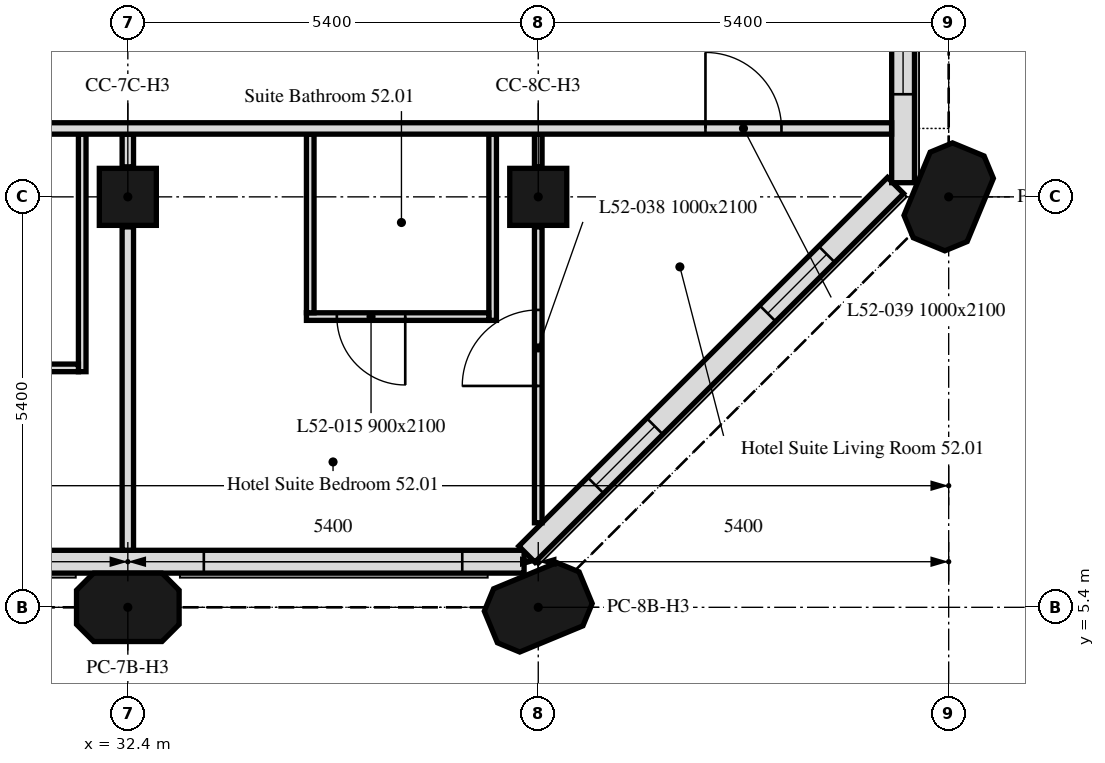
"""IFC4 building model, lengths in metres.
Left out: names, types, materials, properties, quantities, classifications, styles, units other than length and angle.
Written with IfcOpenShell. Run it as: python <this file> out.ifc"""

import sys

from ifc_helpers import new_model, si_unit, direction, frame, frame_2d, origin, origin_2d, place, context, subcontext, project, spatial, polyline, rectangle, outline, extrude, element, fill, save


model = new_model("IFC4")
c1 = context("Model", 3, precision=1e-05, world=origin(), true_north=direction((0.0, 1.0)))
c2 = subcontext(c1, "Body", "Model", "MODEL_VIEW")
j1 = project(units=[si_unit("LENGTHUNIT", "METRE"), si_unit("PLANEANGLEUNIT", "RADIAN")], contexts=[c1])
p1 = place(None, origin())
s1 = spatial("IfcSite", under=j1, at=p1, CompositionType="ELEMENT")
p2 = place(p1, origin())
s2 = spatial("IfcBuilding", under=s1, at=p2, CompositionType="ELEMENT")
p3 = place(p2, frame((0.0, 0.0, 210.4)))
s3 = spatial("IfcBuildingStorey", under=s2, at=p3, CompositionType="ELEMENT", Elevation=210.4)
for number, where, z_axis, x_axis in (
    (1, (32.4, 5.4, 0.0), (0.0, 0.0, 1.0), (1.0, 0.0, 0.0)),
    (2, (37.8, 5.4, 0.0), (0.0, 0.0, 1.0), (0.924, 0.383, 0.0)),
):
    element("IfcColumn", number, at=place(p3, frame(where, z_axis=z_axis, x_axis=x_axis)), inside=s3, PredefinedType="COLUMN", context=c2, shape_type="SweptSolid", body=[
        extrude(outline(polyline([(-0.45, -0.45), (0.45, -0.45), (0.675, -0.225), (0.675, 0.225), (0.45, 0.45), (-0.45, 0.45), (-0.675, 0.225), (-0.675, -0.225), (-0.45, -0.45)])), origin(), (0.0, 0.0, 1.0), 3.0),
    ])
for number, where, z_axis, x_axis in (
    (3, (32.4, 10.8, 0.0), (0.0, 0.0, 1.0), (1.0, 0.0, 0.0)),
    (4, (37.8, 10.8, 0.0), (0.0, 0.0, 1.0), (1.0, 0.0, 0.0)),
):
    element("IfcColumn", number, at=place(p3, frame(where, z_axis=z_axis, x_axis=x_axis)), inside=s3, PredefinedType="COLUMN", context=c2, shape_type="SweptSolid", body=[
        extrude(rectangle(XDim=0.75, YDim=0.75, at=origin_2d()), origin(), (0.0, 0.0, 1.0), 3.0),
    ])
p4 = place(p3, frame((43.2, 10.8, 0.0), z_axis=(0.0, 0.0, 1.0), x_axis=(0.382683432365, 0.923879532511, 0.0)))
e5 = element("IfcColumn", 5, at=p4, inside=s3, PredefinedType="COLUMN", context=c2, shape_type="SweptSolid", body=[
    extrude(outline(polyline([(-0.45, -0.45), (0.45, -0.45), (0.675, -0.225), (0.675, 0.225), (0.45, 0.45), (-0.45, 0.45), (-0.675, 0.225), (-0.675, -0.225), (-0.45, -0.45)])), origin(), (0.0, 0.0, 1.0), 3.0),
])
p5 = place(p3, frame((5.586, 6.0, 0.0), z_axis=(0.0, 0.0, 1.0), x_axis=(1.0, 0.0, 0.0)))
e6 = element("IfcWall", 6, at=p5, inside=s3, PredefinedType="SOLIDWALL", context=c2, shape_type="SweptSolid", body=[
    extrude(rectangle(XDim=32.027, YDim=0.3, at=frame_2d((16.014, 0.0))), origin(), (0.0, 0.0, 1.0), 3.0),
])
p6 = place(p5, frame((2.764, 0.0, 0.9)))
e7 = element("IfcOpeningElement", 7, at=p6, cuts=e6, PredefinedType="OPENING", context=c2, shape_type="SweptSolid", body=[
    extrude(rectangle(XDim=1.1, YDim=1.7, at=frame_2d((0.55, 0.85))), frame((0.0, 0.16, 0.0), z_axis=(0.0, -1.0, 0.0), x_axis=(1.0, 0.0, 0.0)), (0.0, 0.0, 1.0), 0.32),
])
p7 = place(p5, frame((6.214, 0.0, 0.9)))
e8 = element("IfcOpeningElement", 8, at=p7, cuts=e6, PredefinedType="OPENING", context=c2, shape_type="SweptSolid", body=[
    extrude(rectangle(XDim=3.4, YDim=1.7, at=frame_2d((1.7, 0.85))), frame((0.0, 0.16, 0.0), z_axis=(0.0, -1.0, 0.0), x_axis=(1.0, 0.0, 0.0)), (0.0, 0.0, 1.0), 0.32),
])
p8 = place(p5, frame((13.564, 0.0, 0.9)))
e9 = element("IfcOpeningElement", 9, at=p8, cuts=e6, PredefinedType="OPENING", context=c2, shape_type="SweptSolid", body=[
    extrude(rectangle(XDim=1.1, YDim=1.7, at=frame_2d((0.55, 0.85))), frame((0.0, 0.16, 0.0), z_axis=(0.0, -1.0, 0.0), x_axis=(1.0, 0.0, 0.0)), (0.0, 0.0, 1.0), 0.32),
])
p9 = place(p5, frame((17.014, 0.0, 0.9)))
e10 = element("IfcOpeningElement", 10, at=p9, cuts=e6, PredefinedType="OPENING", context=c2, shape_type="SweptSolid", body=[
    extrude(rectangle(XDim=3.4, YDim=1.7, at=frame_2d((1.7, 0.85))), frame((0.0, 0.16, 0.0), z_axis=(0.0, -1.0, 0.0), x_axis=(1.0, 0.0, 0.0)), (0.0, 0.0, 1.0), 0.32),
])
p10 = place(p5, frame((24.364, 0.0, 0.9)))
e11 = element("IfcOpeningElement", 11, at=p10, cuts=e6, PredefinedType="OPENING", context=c2, shape_type="SweptSolid", body=[
    extrude(rectangle(XDim=1.1, YDim=1.7, at=frame_2d((0.55, 0.85))), frame((0.0, 0.16, 0.0), z_axis=(0.0, -1.0, 0.0), x_axis=(1.0, 0.0, 0.0)), (0.0, 0.0, 1.0), 0.32),
])
p11 = place(p5, frame((27.814, 0.0, 0.9)))
e12 = element("IfcOpeningElement", 12, at=p11, cuts=e6, PredefinedType="OPENING", context=c2, shape_type="SweptSolid", body=[
    extrude(rectangle(XDim=3.4, YDim=1.7, at=frame_2d((1.7, 0.85))), frame((0.0, 0.16, 0.0), z_axis=(0.0, -1.0, 0.0), x_axis=(1.0, 0.0, 0.0)), (0.0, 0.0, 1.0), 0.32),
])
p12 = place(p3, frame((37.65, 6.099, 0.0), z_axis=(0.0, 0.0, 1.0), x_axis=(0.707106781187, 0.707106781187, 0.0)))
e13 = element("IfcWall", 13, at=p12, inside=s3, PredefinedType="SOLIDWALL", context=c2, shape_type="SweptSolid", body=[
    extrude(rectangle(XDim=6.86, YDim=0.3, at=frame_2d((3.43, 0.0))), origin(), (0.0, 0.0, 1.0), 3.0),
])
p13 = place(p12, frame((1.28, 0.0, 0.9)))
e14 = element("IfcOpeningElement", 14, at=p13, cuts=e13, PredefinedType="OPENING", context=c2, shape_type="SweptSolid", body=[
    extrude(rectangle(XDim=1.1, YDim=1.7, at=frame_2d((0.55, 0.85))), frame((0.0, 0.16, 0.0), z_axis=(0.0, -1.0, 0.0), x_axis=(1.0, 0.0, 0.0)), (0.0, 0.0, 1.0), 0.32),
])
p14 = place(p12, frame((4.48, 0.0, 0.9)))
e15 = element("IfcOpeningElement", 15, at=p14, cuts=e13, PredefinedType="OPENING", context=c2, shape_type="SweptSolid", body=[
    extrude(rectangle(XDim=1.1, YDim=1.7, at=frame_2d((0.55, 0.85))), frame((0.0, 0.16, 0.0), z_axis=(0.0, -1.0, 0.0), x_axis=(1.0, 0.0, 0.0)), (0.0, 0.0, 1.0), 0.32),
])
p15 = place(p3, frame((42.6, 10.986, 0.0), z_axis=(0.0, 0.0, 1.0), x_axis=(0.0, 1.0, 0.0)))
e16 = element("IfcWall", 16, at=p15, inside=s3, PredefinedType="SOLIDWALL", context=c2, shape_type="SweptSolid", body=[
    extrude(rectangle(XDim=5.214, YDim=0.3, at=frame_2d((2.607, 0.0))), origin(), (0.0, 0.0, 1.0), 3.0),
])
p16 = place(p15, frame((1.164, 0.0, 0.9)))
e17 = element("IfcOpeningElement", 17, at=p16, cuts=e16, PredefinedType="OPENING", context=c2, shape_type="SweptSolid", body=[
    extrude(rectangle(XDim=1.1, YDim=1.7, at=frame_2d((0.55, 0.85))), frame((0.0, 0.16, 0.0), z_axis=(0.0, -1.0, 0.0), x_axis=(1.0, 0.0, 0.0)), (0.0, 0.0, 1.0), 0.32),
])
p17 = place(p15, frame((2.764, 0.0, 0.9)))
e18 = element("IfcOpeningElement", 18, at=p17, cuts=e16, PredefinedType="OPENING", context=c2, shape_type="SweptSolid", body=[
    extrude(rectangle(XDim=1.1, YDim=1.7, at=frame_2d((0.55, 0.85))), frame((0.0, 0.16, 0.0), z_axis=(0.0, -1.0, 0.0), x_axis=(1.0, 0.0, 0.0)), (0.0, 0.0, 1.0), 0.32),
])
p18 = place(p3, frame((37.8, 6.512, 0.0), z_axis=(0.0, 0.0, 1.0), x_axis=(0.0, 1.0, 0.0)))
e19 = element("IfcWall", 19, at=p18, inside=s3, PredefinedType="PARTITIONING", context=c2, shape_type="SweptSolid", body=[
    extrude(rectangle(XDim=3.893, YDim=0.1, at=frame_2d((1.946, 0.0))), origin(), (0.0, 0.0, 1.0), 3.0),
])
p19 = place(p18, frame((1.8, 0.0, 0.0)))
e20 = element("IfcOpeningElement", 20, at=p19, cuts=e19, PredefinedType="OPENING", context=c2, shape_type="SweptSolid", body=[
    extrude(rectangle(XDim=1.0, YDim=2.1, at=frame_2d((0.5, 1.05))), frame((0.0, 0.05, 0.0), z_axis=(0.0, -1.0, 0.0), x_axis=(1.0, 0.0, 0.0)), (0.0, 0.0, 1.0), 0.1),
])
p20 = place(p3, frame((37.8, 11.195, 0.0), z_axis=(0.0, 0.0, 1.0), x_axis=(0.0, 1.0, 0.0)))
e21 = element("IfcWall", 21, at=p20, inside=s3, PredefinedType="PARTITIONING", context=c2, shape_type="SweptSolid", body=[
    extrude(rectangle(XDim=0.43, YDim=0.1, at=frame_2d((0.215, 0.0))), origin(), (0.0, 0.0, 1.0), 3.0),
])
p21 = place(p3, frame((37.2, 11.625, 0.0), z_axis=(0.0, 0.0, 1.0), x_axis=(0.0, -1.0, 0.0)))
e22 = element("IfcWall", 22, at=p21, inside=s3, PredefinedType="PARTITIONING", context=c2, shape_type="SweptSolid", body=[
    extrude(rectangle(XDim=2.45, YDim=0.1, at=frame_2d((1.225, 0.0))), origin(), (0.0, 0.0, 1.0), 3.0),
])
p22 = place(p3, frame((37.15, 9.225, 0.0), z_axis=(0.0, 0.0, 1.0), x_axis=(-1.0, 0.0, 0.0)))
e23 = element("IfcWall", 23, at=p22, inside=s3, PredefinedType="PARTITIONING", context=c2, shape_type="SweptSolid", body=[
    extrude(rectangle(XDim=2.4, YDim=0.1, at=frame_2d((1.2, 0.0))), origin(), (0.0, 0.0, 1.0), 3.0),
])
p23 = place(p22, frame((1.1, 0.0, 0.0)))
e24 = element("IfcOpeningElement", 24, at=p23, cuts=e23, PredefinedType="OPENING", context=c2, shape_type="SweptSolid", body=[
    extrude(rectangle(XDim=0.9, YDim=2.1, at=frame_2d((0.45, 1.05))), frame((0.0, 0.05, 0.0), z_axis=(0.0, -1.0, 0.0), x_axis=(1.0, 0.0, 0.0)), (0.0, 0.0, 1.0), 0.1),
])
p24 = place(p3, frame((34.8, 9.275, 0.0), z_axis=(0.0, 0.0, 1.0), x_axis=(0.0, 1.0, 0.0)))
e25 = element("IfcWall", 25, at=p24, inside=s3, PredefinedType="PARTITIONING", context=c2, shape_type="SweptSolid", body=[
    extrude(rectangle(XDim=2.35, YDim=0.1, at=frame_2d((1.175, 0.0))), origin(), (0.0, 0.0, 1.0), 3.0),
])
p25 = place(p3, frame((32.4, 11.625, 0.0), z_axis=(0.0, 0.0, 1.0), x_axis=(0.0, -1.0, 0.0)))
e26 = element("IfcWall", 26, at=p25, inside=s3, PredefinedType="PARTITIONING", context=c2, shape_type="SweptSolid", body=[
    extrude(rectangle(XDim=0.43, YDim=0.15, at=frame_2d((0.215, 0.0))), origin(), (0.0, 0.0, 1.0), 3.0),
])
p26 = place(p3, frame((32.4, 10.405, 0.0), z_axis=(0.0, 0.0, 1.0), x_axis=(0.0, -1.0, 0.0)))
e27 = element("IfcWall", 27, at=p26, inside=s3, PredefinedType="PARTITIONING", context=c2, shape_type="SweptSolid", body=[
    extrude(rectangle(XDim=4.254, YDim=0.15, at=frame_2d((2.127, 0.0))), origin(), (0.0, 0.0, 1.0), 3.0),
])
p27 = place(p3, frame((31.8, 11.625, 0.0), z_axis=(0.0, 0.0, 1.0), x_axis=(0.0, -1.0, 0.0)))
e28 = element("IfcWall", 28, at=p27, inside=s3, PredefinedType="PARTITIONING", context=c2, shape_type="SweptSolid", body=[
    extrude(rectangle(XDim=3.125, YDim=0.1, at=frame_2d((1.562, 0.0))), origin(), (0.0, 0.0, 1.0), 3.0),
])
p28 = place(p3, frame((31.75, 8.55, 0.0), z_axis=(0.0, 0.0, 1.0), x_axis=(-1.0, 0.0, 0.0)))
e29 = element("IfcWall", 29, at=p28, inside=s3, PredefinedType="PARTITIONING", context=c2, shape_type="SweptSolid", body=[
    extrude(rectangle(XDim=2.1, YDim=0.1, at=frame_2d((1.05, 0.0))), origin(), (0.0, 0.0, 1.0), 3.0),
])
p29 = place(p3, frame((0.751, 11.7, 0.0), z_axis=(0.0, 0.0, 1.0), x_axis=(1.0, 0.0, 0.0)))
e30 = element("IfcWall", 30, at=p29, inside=s3, PredefinedType="PARTITIONING", context=c2, shape_type="SweptSolid", body=[
    extrude(rectangle(XDim=41.698, YDim=0.15, at=frame_2d((20.849, 0.0))), origin(), (0.0, 0.0, 1.0), 3.0),
])
p30 = place(p29, frame((39.249, 0.0, 0.0)))
e31 = element("IfcOpeningElement", 31, at=p30, cuts=e30, PredefinedType="OPENING", context=c2, shape_type="SweptSolid", body=[
    extrude(rectangle(XDim=1.0, YDim=2.1, at=frame_2d((0.5, 1.05))), frame((0.0, 0.075, 0.0), z_axis=(0.0, -1.0, 0.0), x_axis=(1.0, 0.0, 0.0)), (0.0, 0.0, 1.0), 0.15),
])
p31 = place(p29, frame((27.649, 0.0, 0.0)))
e32 = element("IfcOpeningElement", 32, at=p31, cuts=e30, PredefinedType="OPENING", context=c2, shape_type="SweptSolid", body=[
    extrude(rectangle(XDim=1.0, YDim=2.1, at=frame_2d((0.5, 1.05))), frame((0.0, 0.075, 0.0), z_axis=(0.0, -1.0, 0.0), x_axis=(1.0, 0.0, 0.0)), (0.0, 0.0, 1.0), 0.15),
])
p32 = place(p29, frame((22.249, 0.0, 0.0)))
e33 = element("IfcOpeningElement", 33, at=p32, cuts=e30, PredefinedType="OPENING", context=c2, shape_type="SweptSolid", body=[
    extrude(rectangle(XDim=1.0, YDim=2.1, at=frame_2d((0.5, 1.05))), frame((0.0, 0.075, 0.0), z_axis=(0.0, -1.0, 0.0), x_axis=(1.0, 0.0, 0.0)), (0.0, 0.0, 1.0), 0.15),
])
p33 = place(p29, frame((16.849, 0.0, 0.0)))
e34 = element("IfcOpeningElement", 34, at=p33, cuts=e30, PredefinedType="OPENING", context=c2, shape_type="SweptSolid", body=[
    extrude(rectangle(XDim=1.0, YDim=2.1, at=frame_2d((0.5, 1.05))), frame((0.0, 0.075, 0.0), z_axis=(0.0, -1.0, 0.0), x_axis=(1.0, 0.0, 0.0)), (0.0, 0.0, 1.0), 0.15),
])
p34 = place(p29, frame((11.449, 0.0, 0.0)))
e35 = element("IfcOpeningElement", 35, at=p34, cuts=e30, PredefinedType="OPENING", context=c2, shape_type="SweptSolid", body=[
    extrude(rectangle(XDim=1.0, YDim=2.1, at=frame_2d((0.5, 1.05))), frame((0.0, 0.075, 0.0), z_axis=(0.0, -1.0, 0.0), x_axis=(1.0, 0.0, 0.0)), (0.0, 0.0, 1.0), 0.15),
])
p35 = place(p29, frame((2.744, 0.0, 0.0)))
e36 = element("IfcOpeningElement", 36, at=p35, cuts=e30, PredefinedType="OPENING", context=c2, shape_type="SweptSolid", body=[
    extrude(rectangle(XDim=1.0, YDim=2.1, at=frame_2d((0.5, 1.05))), frame((0.0, 0.075, 0.0), z_axis=(0.0, -1.0, 0.0), x_axis=(1.0, 0.0, 0.0)), (0.0, 0.0, 1.0), 0.15),
])
p36 = place(p11, origin())
e37 = element("IfcWindow", 37, at=p36, inside=s3, PartitioningType="SINGLE_PANEL", PredefinedType="WINDOW", context=c2, shape_type="SweptSolid", body=[
    extrude(rectangle(XDim=3.4, YDim=1.7, at=frame_2d((1.7, 0.85))), frame((0.0, 0.03, 0.0), z_axis=(0.0, -1.0, 0.0), x_axis=(1.0, 0.0, 0.0)), (0.0, 0.0, 1.0), 0.06),
])
fill(e12, e37)
p37 = place(p13, origin())
e38 = element("IfcWindow", 38, at=p37, inside=s3, PartitioningType="SINGLE_PANEL", PredefinedType="WINDOW", context=c2, shape_type="SweptSolid", body=[
    extrude(rectangle(XDim=1.1, YDim=1.7, at=frame_2d((0.55, 0.85))), frame((0.0, 0.03, 0.0), z_axis=(0.0, -1.0, 0.0), x_axis=(1.0, 0.0, 0.0)), (0.0, 0.0, 1.0), 0.06),
])
fill(e14, e38)
p38 = place(p14, origin())
e39 = element("IfcWindow", 39, at=p38, inside=s3, PartitioningType="SINGLE_PANEL", PredefinedType="WINDOW", context=c2, shape_type="SweptSolid", body=[
    extrude(rectangle(XDim=1.1, YDim=1.7, at=frame_2d((0.55, 0.85))), frame((0.0, 0.03, 0.0), z_axis=(0.0, -1.0, 0.0), x_axis=(1.0, 0.0, 0.0)), (0.0, 0.0, 1.0), 0.06),
])
fill(e15, e39)
p39 = place(p16, origin())
e40 = element("IfcWindow", 40, at=p39, inside=s3, PartitioningType="SINGLE_PANEL", PredefinedType="WINDOW", context=c2, shape_type="SweptSolid", body=[
    extrude(rectangle(XDim=1.1, YDim=1.7, at=frame_2d((0.55, 0.85))), frame((0.0, 0.03, 0.0), z_axis=(0.0, -1.0, 0.0), x_axis=(1.0, 0.0, 0.0)), (0.0, 0.0, 1.0), 0.06),
])
fill(e17, e40)
p40 = place(p23, origin())
e41 = element("IfcDoor", 41, at=p40, inside=s3, OperationType="SINGLE_SWING_LEFT", PredefinedType="DOOR", context=c2, shape_type="SweptSolid", body=[
    extrude(rectangle(XDim=0.9, YDim=2.1, at=frame_2d((0.45, 1.05))), frame((0.0, 0.025, 0.0), z_axis=(0.0, -1.0, 0.0), x_axis=(1.0, 0.0, 0.0)), (0.0, 0.0, 1.0), 0.05),
])
fill(e24, e41)
p41 = place(p19, origin())
e42 = element("IfcDoor", 42, at=p41, inside=s3, OperationType="SINGLE_SWING_LEFT", PredefinedType="DOOR", context=c2, shape_type="SweptSolid", body=[
    extrude(rectangle(XDim=1.0, YDim=2.1, at=frame_2d((0.5, 1.05))), frame((0.0, 0.025, 0.0), z_axis=(0.0, -1.0, 0.0), x_axis=(1.0, 0.0, 0.0)), (0.0, 0.0, 1.0), 0.05),
])
fill(e20, e42)
p42 = place(p30, origin())
e43 = element("IfcDoor", 43, at=p42, inside=s3, OperationType="SINGLE_SWING_RIGHT", PredefinedType="DOOR", context=c2, shape_type="SweptSolid", body=[
    extrude(rectangle(XDim=1.0, YDim=2.1, at=frame_2d((0.5, 1.05))), frame((0.0, 0.025, 0.0), z_axis=(0.0, -1.0, 0.0), x_axis=(1.0, 0.0, 0.0)), (0.0, 0.0, 1.0), 0.05),
])
fill(e31, e43)
save(model, sys.argv[1])
